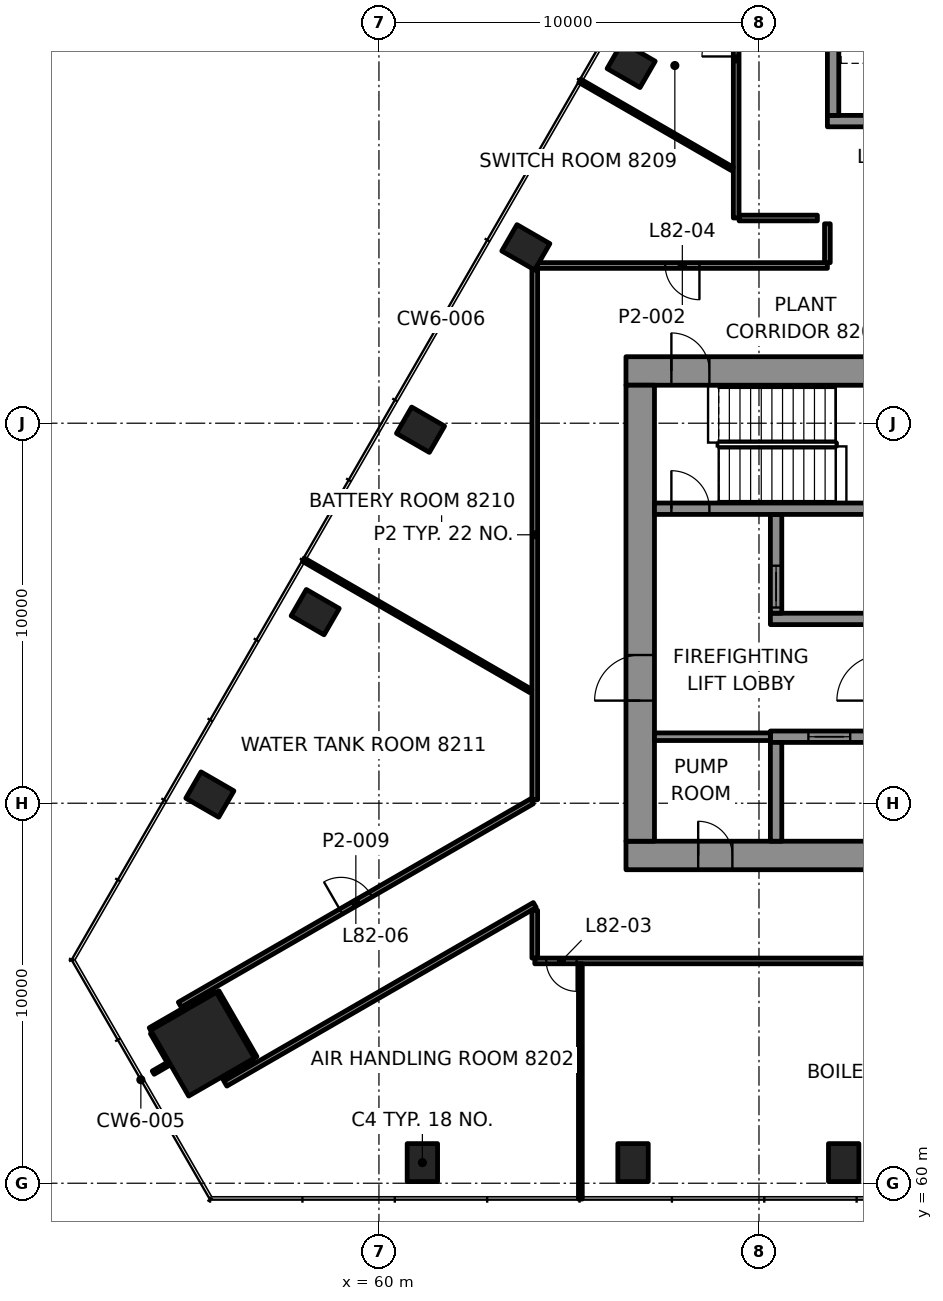
"""IFC4 building model, lengths in metres.
Left out: names, types, materials, properties, quantities, classifications, styles, units other than length and angle.
Written with IfcOpenShell. Run it as: python <this file> out.ifc"""

import sys

from ifc_helpers import new_model, si_unit, direction, frame, frame_2d, origin, origin_2d, place, context, subcontext, project, spatial, rectangle, hollow_rectangle, extrude, element, fill, save


model = new_model("IFC4")
c1 = context("Model", 3, precision=1e-05, world=origin(), true_north=direction((0.0, 1.0)))
c2 = subcontext(c1, "Body", "Model", "MODEL_VIEW")
j1 = project(units=[si_unit("LENGTHUNIT", "METRE"), si_unit("PLANEANGLEUNIT", "RADIAN")], contexts=[c1])
p1 = place(None, origin())
s1 = spatial("IfcSite", under=j1, at=p1, CompositionType="ELEMENT")
p2 = place(p1, origin())
s2 = spatial("IfcBuilding", under=s1, at=p2, CompositionType="ELEMENT")
p3 = place(p2, frame((0.0, 0.0, 335.6)))
s3 = spatial("IfcBuildingStorey", under=s2, at=p3, CompositionType="ELEMENT", Elevation=335.6)
p4 = place(p3, frame((55.359, 63.66, 0.0), z_axis=(0.0, 0.0, 1.0), x_axis=(0.5, -0.866025403784, 0.0)))
e1 = element("IfcColumn", 1, at=p4, inside=s3, PredefinedType="COLUMN", context=c2, shape_type="SweptSolid", body=[
    extrude(rectangle(XDim=2.0, YDim=2.0, at=origin_2d()), origin(), (0.0, 0.0, 1.0), 4.0),
])
for number, where, z_axis, x_axis in (
    (2, (61.143, 60.542, -0.0), (0.0, 0.0, 1.0), (1.0, 0.0, 0.0)),
    (3, (66.686, 60.542, -0.0), (0.0, 0.0, 1.0), (1.0, 0.0, 0.0)),
    (4, (72.229, 60.542, -0.0), (0.0, 0.0, 1.0), (1.0, 0.0, 0.0)),
    (5, (66.636, 89.429, -0.0), (0.0, 0.0, 1.0), (-0.5, -0.866, 0.0)),
    (6, (63.865, 84.629, -0.0), (0.0, 0.0, 1.0), (-0.5, -0.866, 0.0)),
    (7, (61.094, 79.829, -0.0), (0.0, 0.0, 1.0), (-0.5, -0.866, 0.0)),
    (8, (58.322, 75.028, -0.0), (0.0, 0.0, 1.0), (-0.5, -0.866, 0.0)),
    (9, (55.551, 70.228, -0.0), (0.0, 0.0, 1.0), (-0.5, -0.866, 0.0)),
):
    element("IfcColumn", number, at=place(p3, frame(where, z_axis=z_axis, x_axis=x_axis)), inside=s3, PredefinedType="COLUMN", context=c2, shape_type="SweptSolid", body=[
        extrude(hollow_rectangle(XDim=0.8, YDim=1.0, WallThickness=0.05, at=origin_2d()), origin(), (0.0, 0.0, 1.0), 3.701),
    ])
p5 = place(p3, frame((66.5, 68.625, 0.0), z_axis=(0.0, 0.0, 1.0), x_axis=(1.0, 0.0, 0.0)))
e10 = element("IfcWall", 10, at=p5, inside=s3, PredefinedType="SHEAR", context=c2, shape_type="SweptSolid", body=[
    extrude(rectangle(XDim=17.0, YDim=0.75, at=frame_2d((8.5, 0.0))), origin(), (0.0, 0.0, 1.0), 3.7),
])
p6 = place(p5, frame((1.9, 0.0, 0.0)))
e11 = element("IfcOpeningElement", 11, at=p6, cuts=e10, PredefinedType="OPENING", context=c2, shape_type="SweptSolid", body=[
    extrude(rectangle(XDim=0.9, YDim=2.1, at=frame_2d((0.45, 1.05))), frame((0.0, 0.385, 0.0), z_axis=(0.0, -1.0, 0.0), x_axis=(1.0, 0.0, 0.0)), (0.0, 0.0, 1.0), 0.77),
])
p7 = place(p3, frame((66.5, 81.375, 0.0), z_axis=(0.0, 0.0, 1.0), x_axis=(1.0, 0.0, 0.0)))
e12 = element("IfcWall", 12, at=p7, inside=s3, PredefinedType="SHEAR", context=c2, shape_type="SweptSolid", body=[
    extrude(rectangle(XDim=17.0, YDim=0.75, at=frame_2d((8.5, 0.0))), origin(), (0.0, 0.0, 1.0), 3.7),
])
p8 = place(p7, frame((1.195, 0.0, 0.0)))
e13 = element("IfcOpeningElement", 13, at=p8, cuts=e12, PredefinedType="OPENING", context=c2, shape_type="SweptSolid", body=[
    extrude(rectangle(XDim=1.0, YDim=2.1, at=frame_2d((0.5, 1.05))), frame((0.0, 0.385, 0.0), z_axis=(0.0, -1.0, 0.0), x_axis=(1.0, 0.0, 0.0)), (0.0, 0.0, 1.0), 0.77),
])
p9 = place(p7, frame((15.005, 0.0, 0.0)))
e14 = element("IfcOpeningElement", 14, at=p9, cuts=e12, PredefinedType="OPENING", context=c2, shape_type="SweptSolid", body=[
    extrude(rectangle(XDim=1.0, YDim=2.1, at=frame_2d((0.5, 1.05))), frame((0.0, 0.385, 0.0), z_axis=(0.0, -1.0, 0.0), x_axis=(1.0, 0.0, 0.0)), (0.0, 0.0, 1.0), 0.77),
])
p10 = place(p7, frame((8.15, 0.0, 0.0)))
e15 = element("IfcOpeningElement", 15, at=p10, cuts=e12, PredefinedType="OPENING", context=c2, shape_type="SweptSolid", body=[
    extrude(rectangle(XDim=0.9, YDim=2.1, at=frame_2d((0.45, 1.05))), frame((0.0, 0.385, 0.0), z_axis=(0.0, -1.0, 0.0), x_axis=(1.0, 0.0, 0.0)), (0.0, 0.0, 1.0), 0.77),
])
p11 = place(p3, frame((66.875, 69.0, 0.0), z_axis=(0.0, 0.0, 1.0), x_axis=(0.0, 1.0, 0.0)))
e16 = element("IfcWall", 16, at=p11, inside=s3, PredefinedType="SHEAR", context=c2, shape_type="SweptSolid", body=[
    extrude(rectangle(XDim=12.0, YDim=0.75, at=frame_2d((6.0, 0.0))), origin(), (0.0, 0.0, 1.0), 3.7),
])
p12 = place(p11, frame((3.7, 0.0, 0.0)))
e17 = element("IfcOpeningElement", 17, at=p12, cuts=e16, PredefinedType="OPENING", context=c2, shape_type="SweptSolid", body=[
    extrude(rectangle(XDim=1.2, YDim=2.1, at=frame_2d((0.6, 1.05))), frame((0.0, 0.385, 0.0), z_axis=(0.0, -1.0, 0.0), x_axis=(1.0, 0.0, 0.0)), (0.0, 0.0, 1.0), 0.77),
])
p13 = place(p3, frame((70.3, 71.75, 0.0), z_axis=(0.0, 0.0, 1.0), x_axis=(1.0, 0.0, 0.0)))
e18 = element("IfcWall", 18, at=p13, inside=s3, PredefinedType="SHEAR", context=c2, shape_type="SweptSolid", body=[
    extrude(rectangle(XDim=11.5, YDim=0.3, at=frame_2d((5.75, 0.0))), origin(), (0.0, 0.0, 1.0), 3.7),
])
p14 = place(p13, frame((1.0, 0.0, 0.0)))
e19 = element("IfcOpeningElement", 19, at=p14, cuts=e18, PredefinedType="OPENING", context=c2, shape_type="SweptSolid", body=[
    extrude(rectangle(XDim=1.1, YDim=2.1, at=frame_2d((0.55, 1.05))), frame((0.0, 0.16, 0.0), z_axis=(0.0, -1.0, 0.0), x_axis=(1.0, 0.0, 0.0)), (0.0, 0.0, 1.0), 0.32),
])
p15 = place(p3, frame((70.3, 74.85, 0.0), z_axis=(0.0, 0.0, 1.0), x_axis=(1.0, 0.0, 0.0)))
e20 = element("IfcWall", 20, at=p15, inside=s3, PredefinedType="SHEAR", context=c2, shape_type="SweptSolid", body=[
    extrude(rectangle(XDim=5.9, YDim=0.3, at=frame_2d((2.95, 0.0))), origin(), (0.0, 0.0, 1.0), 3.7),
])
p16 = place(p3, frame((70.45, 69.0, 0.0), z_axis=(0.0, 0.0, 1.0), x_axis=(0.0, 1.0, 0.0)))
e21 = element("IfcWall", 21, at=p16, inside=s3, PredefinedType="SHEAR", context=c2, shape_type="SweptSolid", body=[
    extrude(rectangle(XDim=2.6, YDim=0.3, at=frame_2d((1.3, 0.0))), origin(), (0.0, 0.0, 1.0), 3.7),
])
p17 = place(p3, frame((70.45, 75.0, 0.0), z_axis=(0.0, 0.0, 1.0), x_axis=(0.0, 1.0, 0.0)))
e22 = element("IfcWall", 22, at=p17, inside=s3, PredefinedType="SHEAR", context=c2, shape_type="SweptSolid", body=[
    extrude(rectangle(XDim=2.6, YDim=0.3, at=frame_2d((1.3, 0.0))), origin(), (0.0, 0.0, 1.0), 3.7),
])
p18 = place(p17, frame((0.15, 0.0, 0.0)))
e23 = element("IfcOpeningElement", 23, at=p18, cuts=e22, PredefinedType="OPENING", context=c2, shape_type="SweptSolid", body=[
    extrude(rectangle(XDim=1.1, YDim=2.1, at=frame_2d((0.55, 1.05))), frame((0.0, 0.16, 0.0), z_axis=(0.0, -1.0, 0.0), x_axis=(1.0, 0.0, 0.0)), (0.0, 0.0, 1.0), 0.32),
])
p19 = place(p3, frame((67.25, 77.75, 0.0), z_axis=(0.0, 0.0, 1.0), x_axis=(1.0, 0.0, 0.0)))
e24 = element("IfcWall", 24, at=p19, inside=s3, PredefinedType="SHEAR", context=c2, shape_type="SweptSolid", body=[
    extrude(rectangle(XDim=15.5, YDim=0.3, at=frame_2d((7.75, 0.0))), origin(), (0.0, 0.0, 1.0), 3.7),
])
p20 = place(p19, frame((0.445, 0.0, 0.0)))
e25 = element("IfcOpeningElement", 25, at=p20, cuts=e24, PredefinedType="OPENING", context=c2, shape_type="SweptSolid", body=[
    extrude(rectangle(XDim=1.0, YDim=2.1, at=frame_2d((0.5, 1.05))), frame((0.0, 0.16, 0.0), z_axis=(0.0, -1.0, 0.0), x_axis=(1.0, 0.0, 0.0)), (0.0, 0.0, 1.0), 0.32),
])
p21 = place(p3, frame((71.8, 87.95, 0.0), z_axis=(0.0, 0.0, 1.0), x_axis=(1.0, 0.0, 0.0)))
e26 = element("IfcWall", 26, at=p21, inside=s3, PredefinedType="SHEAR", context=c2, shape_type="SweptSolid", body=[
    extrude(rectangle(XDim=6.4, YDim=0.3, at=frame_2d((3.2, 0.0))), origin(), (0.0, 0.0, 1.0), 3.7),
])
p22 = place(p21, frame((1.325, 0.0, 0.0)))
e27 = element("IfcOpeningElement", 27, at=p22, cuts=e26, PredefinedType="OPENING", context=c2, shape_type="SweptSolid", body=[
    extrude(rectangle(XDim=1.0, YDim=2.1, at=frame_2d((0.5, 1.05))), frame((0.0, 0.16, 0.0), z_axis=(0.0, -1.0, 0.0), x_axis=(1.0, 0.0, 0.0)), (0.0, 0.0, 1.0), 0.32),
])
p23 = place(p21, frame((4.125, 0.0, 0.0)))
e28 = element("IfcOpeningElement", 28, at=p23, cuts=e26, PredefinedType="OPENING", context=c2, shape_type="SweptSolid", body=[
    extrude(rectangle(XDim=1.2, YDim=2.1, at=frame_2d((0.6, 1.05))), frame((0.0, 0.16, 0.0), z_axis=(0.0, -1.0, 0.0), x_axis=(1.0, 0.0, 0.0)), (0.0, 0.0, 1.0), 0.32),
])
p24 = place(p3, frame((71.95, 88.1, 0.0), z_axis=(0.0, 0.0, 1.0), x_axis=(0.0, 1.0, 0.0)))
e29 = element("IfcWall", 29, at=p24, inside=s3, PredefinedType="SHEAR", context=c2, shape_type="SweptSolid", body=[
    extrude(rectangle(XDim=6.2, YDim=0.3, at=frame_2d((3.1, 0.0))), origin(), (0.0, 0.0, 1.0), 3.7),
])
p25 = place(p3, frame((85.899, 65.85, 0.0), z_axis=(0.0, 0.0, 1.0), x_axis=(-1.0, 0.0, 0.0)))
e30 = element("IfcWall", 30, at=p25, inside=s3, PredefinedType="PARTITIONING", context=c2, shape_type="SweptSolid", body=[
    extrude(rectangle(XDim=21.799, YDim=0.15, at=frame_2d((10.899, 0.0))), origin(), (0.0, 0.0, 1.0), 3.1),
])
p26 = place(p25, frame((1.464, 0.0, 0.0)))
e31 = element("IfcOpeningElement", 31, at=p26, cuts=e30, PredefinedType="OPENING", context=c2, shape_type="SweptSolid", body=[
    extrude(rectangle(XDim=0.9, YDim=2.1, at=frame_2d((0.45, 1.05))), frame((0.0, 0.085, 0.0), z_axis=(0.0, -1.0, 0.0), x_axis=(1.0, 0.0, 0.0)), (0.0, 0.0, 1.0), 0.17),
])
p27 = place(p25, frame((11.662, 0.0, 0.0)))
e32 = element("IfcOpeningElement", 32, at=p27, cuts=e30, PredefinedType="OPENING", context=c2, shape_type="SweptSolid", body=[
    extrude(rectangle(XDim=0.9, YDim=2.1, at=frame_2d((0.45, 1.05))), frame((0.0, 0.085, 0.0), z_axis=(0.0, -1.0, 0.0), x_axis=(1.0, 0.0, 0.0)), (0.0, 0.0, 1.0), 0.17),
])
p28 = place(p25, frame((20.698, 0.0, 0.0)))
e33 = element("IfcOpeningElement", 33, at=p28, cuts=e30, PredefinedType="OPENING", context=c2, shape_type="SweptSolid", body=[
    extrude(rectangle(XDim=0.8, YDim=2.1, at=frame_2d((0.4, 1.05))), frame((0.0, 0.085, 0.0), z_axis=(0.0, -1.0, 0.0), x_axis=(1.0, 0.0, 0.0)), (0.0, 0.0, 1.0), 0.17),
])
p29 = place(p3, frame((71.8, 84.15, 0.0), z_axis=(0.0, 0.0, 1.0), x_axis=(-1.0, 0.0, 0.0)))
e34 = element("IfcWall", 34, at=p29, inside=s3, PredefinedType="PARTITIONING", context=c2, shape_type="SweptSolid", body=[
    extrude(rectangle(XDim=7.634, YDim=0.15, at=frame_2d((3.817, 0.0))), origin(), (0.0, 0.0, 1.0), 3.1),
])
p30 = place(p29, frame((3.367, 0.0, 0.0)))
e35 = element("IfcOpeningElement", 35, at=p30, cuts=e34, PredefinedType="OPENING", context=c2, shape_type="SweptSolid", body=[
    extrude(rectangle(XDim=0.9, YDim=2.1, at=frame_2d((0.45, 1.05))), frame((0.0, 0.085, 0.0), z_axis=(0.0, -1.0, 0.0), x_axis=(1.0, 0.0, 0.0)), (0.0, 0.0, 1.0), 0.17),
])
p31 = place(p3, frame((69.476, 85.4, 0.0), z_axis=(0.0, 0.0, 1.0), x_axis=(1.0, 0.0, 0.0)))
e36 = element("IfcWall", 36, at=p31, inside=s3, PredefinedType="PARTITIONING", context=c2, shape_type="SweptSolid", body=[
    extrude(rectangle(XDim=2.061, YDim=0.15, at=frame_2d((1.031, 0.0))), origin(), (0.0, 0.0, 1.0), 3.1),
])
p32 = place(p3, frame((55.959, 62.621, 0.0), z_axis=(0.0, 0.0, 1.0), x_axis=(0.866027286158, 0.499996739618, 0.0)))
e37 = element("IfcWall", 37, at=p32, inside=s3, PredefinedType="PARTITIONING", context=c2, shape_type="SweptSolid", body=[
    extrude(rectangle(XDim=9.4, YDim=0.15, at=frame_2d((4.7, 0.0))), origin(), (0.0, 0.0, 1.0), 3.097),
])
p33 = place(p3, frame((55.859, 62.794, 0.0), z_axis=(0.0, 0.0, 1.0), x_axis=(0.865974401185, 0.500088328689, 0.0)))
e38 = element("IfcWall", 38, at=p33, inside=s3, PredefinedType="PARTITIONING", context=c2, shape_type="SweptSolid", body=[
    extrude(rectangle(XDim=0.924, YDim=0.15, at=frame_2d((0.462, 0.0))), origin(), (0.0, 0.0, 1.0), 3.1),
])
p34 = place(p3, frame((54.06, 62.91, 0.0), z_axis=(0.0, 0.0, 1.0), x_axis=(0.866083962871, 0.499898558967, 0.0)))
e39 = element("IfcWall", 39, at=p34, inside=s3, PredefinedType="PARTITIONING", context=c2, shape_type="SweptSolid", body=[
    extrude(rectangle(XDim=0.44, YDim=0.1, at=frame_2d((0.22, 0.0))), origin(), (0.0, 0.0, 1.0), 3.1),
])
p35 = place(p3, frame((53.993, 64.027, 0.0), z_axis=(0.0, 0.0, 1.0), x_axis=(0.866048237946, 0.499960447986, 0.0)))
e40 = element("IfcWall", 40, at=p35, inside=s3, PredefinedType="PARTITIONING", context=c2, shape_type="SweptSolid", body=[
    extrude(rectangle(XDim=1.924, YDim=0.15, at=frame_2d((0.962, 0.0))), origin(), (0.0, 0.0, 1.0), 3.1),
])
p36 = place(p3, frame((54.759, 64.7, 0.0), z_axis=(0.0, 0.0, 1.0), x_axis=(0.866021425885, 0.500006889861, 0.0)))
e41 = element("IfcWall", 41, at=p36, inside=s3, PredefinedType="PARTITIONING", context=c2, shape_type="SweptSolid", body=[
    extrude(rectangle(XDim=10.699, YDim=0.15, at=frame_2d((5.35, 0.0))), origin(), (0.0, 0.0, 1.0), 3.1),
])
p37 = place(p36, frame((4.9, 0.0, 0.0)))
e42 = element("IfcOpeningElement", 42, at=p37, cuts=e41, PredefinedType="OPENING", context=c2, shape_type="SweptSolid", body=[
    extrude(rectangle(XDim=0.9, YDim=2.1, at=frame_2d((0.45, 1.05))), frame((0.0, 0.085, 0.0), z_axis=(0.0, -1.0, 0.0), x_axis=(1.0, 0.0, 0.0)), (0.0, 0.0, 1.0), 0.17),
])
p38 = place(p3, frame((71.8, 84.225, 0.0), z_axis=(0.0, 0.0, 1.0), x_axis=(0.0, 1.0, 0.0)))
e43 = element("IfcWall", 43, at=p38, inside=s3, PredefinedType="PARTITIONING", context=c2, shape_type="SweptSolid", body=[
    extrude(rectangle(XDim=1.023, YDim=0.15, at=frame_2d((0.511, 0.0))), origin(), (0.0, 0.0, 1.0), 3.1),
])
p39 = place(p3, frame((69.4, 85.4, 0.0), z_axis=(0.0, 0.0, 1.0), x_axis=(0.0, 1.0, 0.0)))
e44 = element("IfcWall", 44, at=p39, inside=s3, PredefinedType="PARTITIONING", context=c2, shape_type="SweptSolid", body=[
    extrude(rectangle(XDim=8.371, YDim=0.15, at=frame_2d((4.186, 0.0))), origin(), (0.0, 0.0, 1.0), 3.1),
])
p40 = place(p39, frame((4.25, 0.0, 0.0)))
e45 = element("IfcOpeningElement", 45, at=p40, cuts=e44, PredefinedType="OPENING", context=c2, shape_type="SweptSolid", body=[
    extrude(rectangle(XDim=0.9, YDim=2.1, at=frame_2d((0.45, 1.05))), frame((0.0, 0.085, 0.0), z_axis=(0.0, -1.0, 0.0), x_axis=(1.0, 0.0, 0.0)), (0.0, 0.0, 1.0), 0.17),
])
p41 = place(p3, frame((65.3, 59.583, 0.0), z_axis=(0.0, 0.0, 1.0), x_axis=(0.0, 1.0, 0.0)))
e46 = element("IfcWall", 46, at=p41, inside=s3, PredefinedType="PARTITIONING", context=c2, shape_type="SweptSolid", body=[
    extrude(rectangle(XDim=6.192, YDim=0.1, at=frame_2d((3.096, 0.0))), origin(), (0.0, 0.0, 1.0), 3.088),
])
p42 = place(p3, frame((64.1, 65.926, 0.0), z_axis=(0.0, 0.0, 1.0), x_axis=(0.0, 1.0, 0.0)))
e47 = element("IfcWall", 47, at=p42, inside=s3, PredefinedType="PARTITIONING", context=c2, shape_type="SweptSolid", body=[
    extrude(rectangle(XDim=1.259, YDim=0.15, at=frame_2d((0.629, 0.0))), origin(), (0.0, 0.0, 1.0), 3.097),
])
p43 = place(p3, frame((64.1, 70.093, 0.0), z_axis=(0.0, 0.0, 1.0), x_axis=(0.0, 1.0, 0.0)))
e48 = element("IfcWall", 48, at=p43, inside=s3, PredefinedType="PARTITIONING", context=c2, shape_type="SweptSolid", body=[
    extrude(rectangle(XDim=13.943, YDim=0.15, at=frame_2d((6.972, 0.0))), origin(), (0.0, 0.0, 1.0), 3.1),
])
p44 = place(p3, frame((56.724, 63.294, 0.0), z_axis=(0.0, 0.0, 1.0), x_axis=(-0.500000846469, 0.866024915075, 0.0)))
e49 = element("IfcWall", 49, at=p44, inside=s3, PredefinedType="PARTITIONING", context=c2, shape_type="SweptSolid", body=[
    extrude(rectangle(XDim=1.999, YDim=0.15, at=frame_2d((1.0, 0.0))), origin(), (0.0, 0.0, 1.0), 3.097),
])
p45 = place(p3, frame((54.493, 63.16, 0.0), z_axis=(0.0, 0.0, 1.0), x_axis=(-0.500172000317, 0.865926076579, 0.0)))
e50 = element("IfcWall", 50, at=p45, inside=s3, PredefinedType="PARTITIONING", context=c2, shape_type="SweptSolid", body=[
    extrude(rectangle(XDim=0.925, YDim=0.1, at=frame_2d((0.462, 0.0))), origin(), (0.0, 0.0, 1.0), 3.1),
])
p46 = place(p3, frame((69.299, 86.692, 0.0), z_axis=(0.0, 0.0, 1.0), x_axis=(-0.866003985137, 0.500037096351, 0.0)))
e51 = element("IfcWall", 51, at=p46, inside=s3, PredefinedType="PARTITIONING", context=c2, shape_type="SweptSolid", body=[
    extrude(rectangle(XDim=4.635, YDim=0.1, at=frame_2d((2.317, 0.0))), origin(), (0.0, 0.0, 1.0), 3.088),
])
p47 = place(p3, frame((63.999, 72.951, 0.0), z_axis=(0.0, 0.0, 1.0), x_axis=(-0.866038012538, 0.499978160363, 0.0)))
e52 = element("IfcWall", 52, at=p47, inside=s3, PredefinedType="PARTITIONING", context=c2, shape_type="SweptSolid", body=[
    extrude(rectangle(XDim=6.915, YDim=0.1, at=frame_2d((3.458, 0.0))), origin(), (0.0, 0.0, 1.0), 3.088),
])
p48 = place(p3, frame((67.25, 71.75, 0.0), z_axis=(0.0, 0.0, 1.0), x_axis=(1.0, 0.0, 0.0)))
e53 = element("IfcWall", 53, at=p48, inside=s3, PredefinedType="PARTITIONING", context=c2, shape_type="SweptSolid", body=[
    extrude(rectangle(XDim=3.05, YDim=0.2, at=frame_2d((1.525, 0.0))), origin(), (0.0, 0.0, 1.0), 3.7),
])
p49 = place(p28, origin())
e54 = element("IfcDoor", 54, at=p49, inside=s3, OperationType="SINGLE_SWING_RIGHT", PredefinedType="DOOR", context=c2, shape_type="SweptSolid", body=[
    extrude(rectangle(XDim=0.8, YDim=2.1, at=frame_2d((0.4, 1.05))), frame((0.0, 0.025, 0.0), z_axis=(0.0, -1.0, 0.0), x_axis=(1.0, 0.0, 0.0)), (0.0, 0.0, 1.0), 0.05),
])
fill(e33, e54)
p50 = place(p30, origin())
e55 = element("IfcDoor", 55, at=p50, inside=s3, OperationType="SINGLE_SWING_RIGHT", PredefinedType="DOOR", context=c2, shape_type="SweptSolid", body=[
    extrude(rectangle(XDim=0.9, YDim=2.1, at=frame_2d((0.45, 1.05))), frame((0.0, 0.025, 0.0), z_axis=(0.0, -1.0, 0.0), x_axis=(1.0, 0.0, 0.0)), (0.0, 0.0, 1.0), 0.05),
])
fill(e35, e55)
p51 = place(p37, origin())
e56 = element("IfcDoor", 56, at=p51, inside=s3, OperationType="SINGLE_SWING_RIGHT", PredefinedType="DOOR", context=c2, shape_type="SweptSolid", body=[
    extrude(rectangle(XDim=0.9, YDim=2.1, at=frame_2d((0.45, 1.05))), frame((0.0, 0.025, 0.0), z_axis=(0.0, -1.0, 0.0), x_axis=(1.0, 0.0, 0.0)), (0.0, 0.0, 1.0), 0.05),
])
fill(e42, e56)
p52 = place(p40, origin())
e57 = element("IfcDoor", 57, at=p52, inside=s3, OperationType="SINGLE_SWING_RIGHT", PredefinedType="DOOR", context=c2, shape_type="SweptSolid", body=[
    extrude(rectangle(XDim=0.9, YDim=2.1, at=frame_2d((0.45, 1.05))), frame((0.0, 0.025, 0.0), z_axis=(0.0, -1.0, 0.0), x_axis=(1.0, 0.0, 0.0)), (0.0, 0.0, 1.0), 0.05),
])
fill(e45, e57)
p53 = place(p14, origin())
e58 = element("IfcDoor", 58, at=p53, inside=s3, OperationType="DOUBLE_DOOR_SLIDING", PredefinedType="DOOR", context=c2, shape_type="SweptSolid", body=[
    extrude(rectangle(XDim=1.1, YDim=2.1, at=frame_2d((0.55, 1.05))), frame((0.0, 0.025, 0.0), z_axis=(0.0, -1.0, 0.0), x_axis=(1.0, 0.0, 0.0)), (0.0, 0.0, 1.0), 0.05),
])
fill(e19, e58)
p54 = place(p18, origin())
e59 = element("IfcDoor", 59, at=p54, inside=s3, OperationType="DOUBLE_DOOR_SLIDING", PredefinedType="DOOR", context=c2, shape_type="SweptSolid", body=[
    extrude(rectangle(XDim=1.1, YDim=2.1, at=frame_2d((0.55, 1.05))), frame((0.0, 0.025, 0.0), z_axis=(0.0, -1.0, 0.0), x_axis=(1.0, 0.0, 0.0)), (0.0, 0.0, 1.0), 0.05),
])
fill(e23, e59)
p55 = place(p20, origin())
e60 = element("IfcDoor", 60, at=p55, inside=s3, OperationType="SINGLE_SWING_LEFT", PredefinedType="DOOR", context=c2, shape_type="SweptSolid", body=[
    extrude(rectangle(XDim=1.0, YDim=2.1, at=frame_2d((0.5, 1.05))), frame((0.0, 0.025, 0.0), z_axis=(0.0, -1.0, 0.0), x_axis=(1.0, 0.0, 0.0)), (0.0, 0.0, 1.0), 0.05),
])
fill(e25, e60)
p56 = place(p8, origin())
e61 = element("IfcDoor", 61, at=p56, inside=s3, OperationType="SINGLE_SWING_RIGHT", PredefinedType="DOOR", context=c2, shape_type="SweptSolid", body=[
    extrude(rectangle(XDim=1.0, YDim=2.1, at=frame_2d((0.5, 1.05))), frame((0.0, 0.095, 0.0), z_axis=(0.0, -1.0, 0.0), x_axis=(1.0, 0.0, 0.0)), (0.0, 0.0, 1.0), 0.19),
])
fill(e13, e61)
p57 = place(p12, origin())
e62 = element("IfcDoor", 62, at=p57, inside=s3, OperationType="SINGLE_SWING_RIGHT", PredefinedType="DOOR", context=c2, shape_type="SweptSolid", body=[
    extrude(rectangle(XDim=1.2, YDim=2.1, at=frame_2d((0.6, 1.05))), frame((0.0, 0.095, 0.0), z_axis=(0.0, -1.0, 0.0), x_axis=(1.0, 0.0, 0.0)), (0.0, 0.0, 1.0), 0.19),
])
fill(e17, e62)
p58 = place(p6, origin())
e63 = element("IfcDoor", 63, at=p58, inside=s3, OperationType="SINGLE_SWING_RIGHT", PredefinedType="DOOR", context=c2, shape_type="SweptSolid", body=[
    extrude(rectangle(XDim=0.9, YDim=2.1, at=frame_2d((0.45, 1.05))), frame((0.0, 0.095, 0.0), z_axis=(0.0, -1.0, 0.0), x_axis=(1.0, 0.0, 0.0)), (0.0, 0.0, 1.0), 0.19),
])
fill(e11, e63)
save(model, sys.argv[1])
